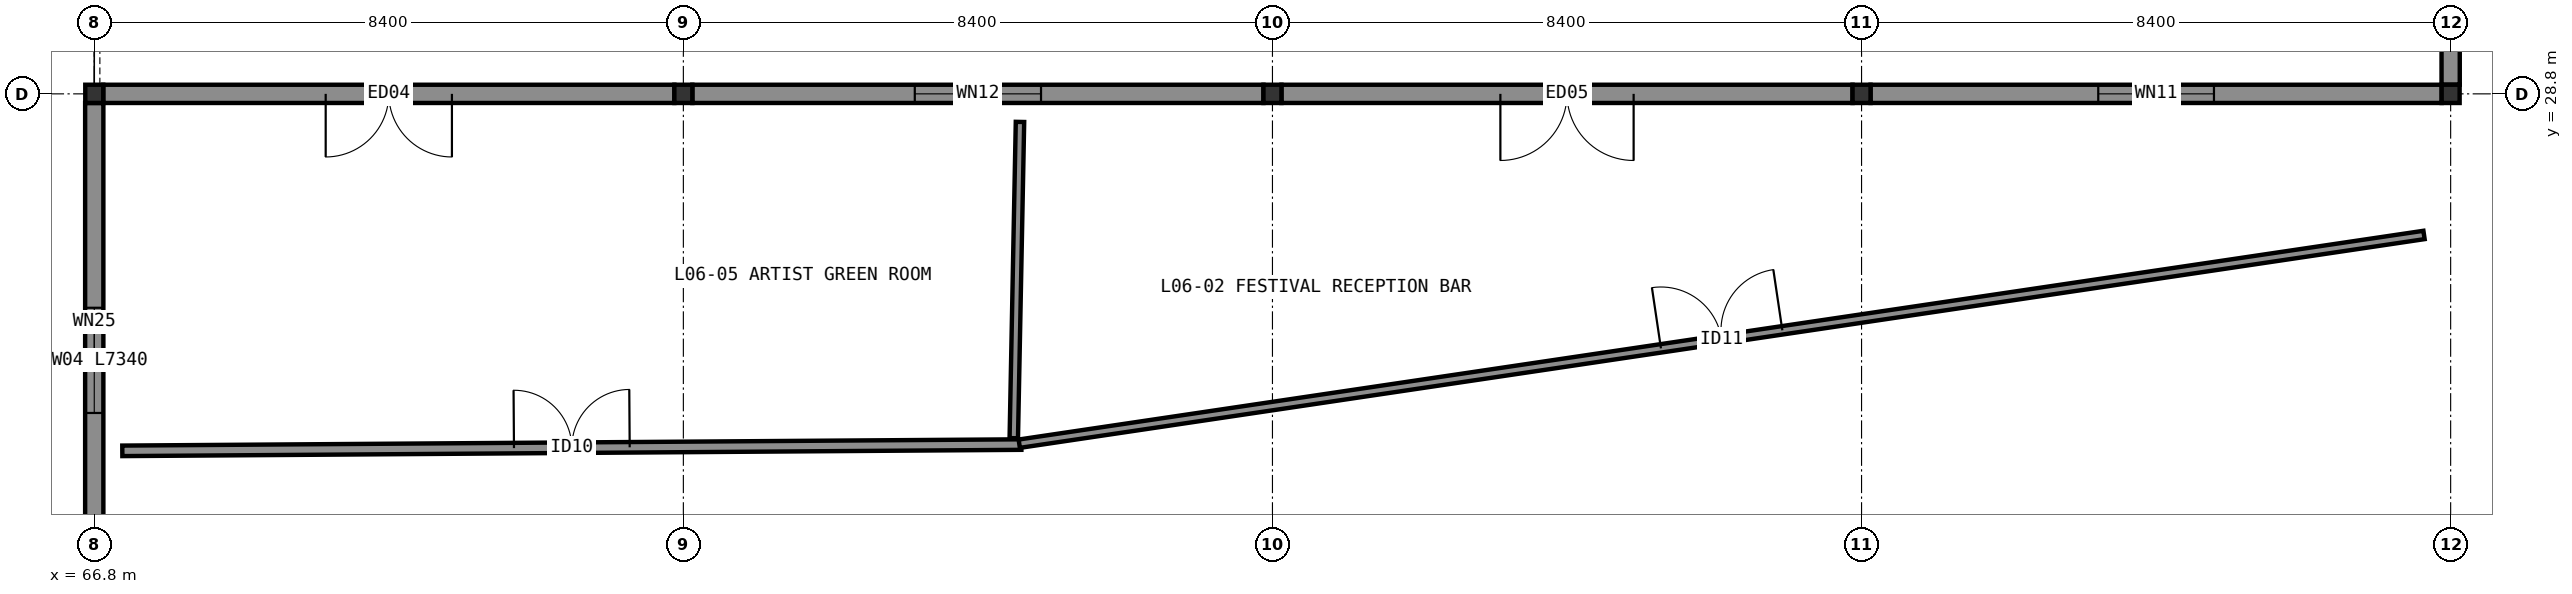
"""IFC4 building model, lengths in metres.
Left out: names, types, materials, properties, quantities, classifications, styles, units other than length and angle.
Written with IfcOpenShell. Run it as: python <this file> out.ifc"""

import sys

from ifc_helpers import new_model, si_unit, direction, frame, frame_2d, origin, origin_2d, place, context, subcontext, project, spatial, rectangle, i_section, extrude, element, fill, save


model = new_model("IFC4")
c1 = context("Model", 3, precision=1e-05, world=origin(), true_north=direction((0.0, 1.0)))
c2 = subcontext(c1, "Body", "Model", "MODEL_VIEW")
j1 = project(units=[si_unit("LENGTHUNIT", "METRE"), si_unit("PLANEANGLEUNIT", "RADIAN")], contexts=[c1])
p1 = place(None, origin())
s1 = spatial("IfcSite", under=j1, at=p1, CompositionType="ELEMENT")
p2 = place(p1, origin())
s2 = spatial("IfcBuilding", under=s1, at=p2, CompositionType="ELEMENT")
p3 = place(p2, frame((0.0, 0.0, 26.4)))
s3 = spatial("IfcBuildingStorey", under=s2, at=p3, CompositionType="ELEMENT", Elevation=26.4)
for number, where, z_axis, x_axis in (
    (1, (66.8, 28.8, 0.0), (0.0, 0.0, 1.0), (1.0, 0.0, 0.0)),
    (2, (75.2, 28.8, 0.0), (0.0, 0.0, 1.0), (1.0, 0.0, 0.0)),
    (3, (83.6, 28.8, 0.0), (0.0, 0.0, 1.0), (1.0, 0.0, 0.0)),
    (4, (92.0, 28.8, 0.0), (0.0, 0.0, 1.0), (1.0, 0.0, 0.0)),
    (5, (100.4, 28.8, 0.0), (0.0, 0.0, 1.0), (1.0, 0.0, 0.0)),
):
    element("IfcColumn", number, at=place(p3, frame(where, z_axis=z_axis, x_axis=x_axis)), inside=s3, PredefinedType="COLUMN", context=c2, shape_type="SweptSolid", body=[
        extrude(i_section(OverallWidth=0.256, OverallDepth=0.26, WebThickness=0.01, FlangeThickness=0.017, FilletRadius=0.013, at=origin_2d()), origin(), (0.0, 0.0, 1.0), 4.8),
    ])
p4 = place(p3, frame((66.8, 28.67, 0.0), z_axis=(0.0, 0.0, 1.0), x_axis=(0.0, -1.0, 0.0)))
e6 = element("IfcWall", 6, at=p4, inside=s3, PredefinedType="SOLIDWALL", context=c2, shape_type="SweptSolid", body=[
    extrude(rectangle(XDim=7.34, YDim=0.26, at=frame_2d((3.67, 0.0))), origin(), (0.0, 0.0, 1.0), 4.227),
])
p5 = place(p4, frame((2.92, 0.0, 0.95)))
e7 = element("IfcOpeningElement", 7, at=p5, cuts=e6, PredefinedType="OPENING", context=c2, shape_type="SweptSolid", body=[
    extrude(rectangle(XDim=1.5, YDim=1.2, at=frame_2d((0.75, 0.6))), frame((0.0, 0.14, 0.0), z_axis=(0.0, -1.0, 0.0), x_axis=(1.0, 0.0, 0.0)), (0.0, 0.0, 1.0), 0.28),
])
p6 = place(p3, frame((100.4, 36.27, 0.0), z_axis=(0.0, 0.0, 1.0), x_axis=(0.0, -1.0, 0.0)))
e8 = element("IfcWall", 8, at=p6, inside=s3, PredefinedType="SOLIDWALL", context=c2, shape_type="SweptSolid", body=[
    extrude(rectangle(XDim=7.34, YDim=0.26, at=frame_2d((3.67, 0.0))), origin(), (0.0, 0.0, 1.0), 4.227),
])
p7 = place(p6, frame((2.92, 0.0, 0.95)))
e9 = element("IfcOpeningElement", 9, at=p7, cuts=e8, PredefinedType="OPENING", context=c2, shape_type="SweptSolid", body=[
    extrude(rectangle(XDim=1.5, YDim=1.8, at=frame_2d((0.75, 0.9))), frame((0.0, 0.14, 0.0), z_axis=(0.0, -1.0, 0.0), x_axis=(1.0, 0.0, 0.0)), (0.0, 0.0, 1.0), 0.28),
])
p8 = place(p3, frame((100.272, 28.8, 0.0), z_axis=(0.0, 0.0, 1.0), x_axis=(-1.0, 0.0, 0.0)))
e10 = element("IfcWall", 10, at=p8, inside=s3, PredefinedType="SOLIDWALL", context=c2, shape_type="SweptSolid", body=[
    extrude(rectangle(XDim=8.144, YDim=0.26, at=frame_2d((4.072, 0.0))), origin(), (0.0, 0.0, 1.0), 4.48),
])
p9 = place(p8, frame((3.247, 0.0, 0.95)))
e11 = element("IfcOpeningElement", 11, at=p9, cuts=e10, PredefinedType="OPENING", context=c2, shape_type="SweptSolid", body=[
    extrude(rectangle(XDim=1.65, YDim=1.8, at=frame_2d((0.825, 0.9))), frame((0.0, 0.14, 0.0), z_axis=(0.0, -1.0, 0.0), x_axis=(1.0, 0.0, 0.0)), (0.0, 0.0, 1.0), 0.28),
])
p10 = place(p3, frame((91.872, 28.8, 0.0), z_axis=(0.0, 0.0, 1.0), x_axis=(-1.0, 0.0, 0.0)))
e12 = element("IfcWall", 12, at=p10, inside=s3, PredefinedType="SOLIDWALL", context=c2, shape_type="SweptSolid", body=[
    extrude(rectangle(XDim=8.144, YDim=0.26, at=frame_2d((4.072, 0.0))), origin(), (0.0, 0.0, 1.0), 4.48),
])
p11 = place(p10, frame((3.122, 0.0, 0.0)))
e13 = element("IfcOpeningElement", 13, at=p11, cuts=e12, PredefinedType="OPENING", context=c2, shape_type="SweptSolid", body=[
    extrude(rectangle(XDim=1.9, YDim=2.25, at=frame_2d((0.95, 1.125))), frame((0.0, 0.14, 0.0), z_axis=(0.0, -1.0, 0.0), x_axis=(1.0, 0.0, 0.0)), (0.0, 0.0, 1.0), 0.28),
])
p12 = place(p3, frame((83.472, 28.8, 0.0), z_axis=(0.0, 0.0, 1.0), x_axis=(-1.0, 0.0, 0.0)))
e14 = element("IfcWall", 14, at=p12, inside=s3, PredefinedType="SOLIDWALL", context=c2, shape_type="SweptSolid", body=[
    extrude(rectangle(XDim=8.144, YDim=0.26, at=frame_2d((4.072, 0.0))), origin(), (0.0, 0.0, 1.0), 4.48),
])
p13 = place(p12, frame((3.172, 0.0, 0.95)))
e15 = element("IfcOpeningElement", 15, at=p13, cuts=e14, PredefinedType="OPENING", context=c2, shape_type="SweptSolid", body=[
    extrude(rectangle(XDim=1.8, YDim=1.8, at=frame_2d((0.9, 0.9))), frame((0.0, 0.14, 0.0), z_axis=(0.0, -1.0, 0.0), x_axis=(1.0, 0.0, 0.0)), (0.0, 0.0, 1.0), 0.28),
])
p14 = place(p3, frame((75.072, 28.8, 0.0), z_axis=(0.0, 0.0, 1.0), x_axis=(-1.0, 0.0, 0.0)))
e16 = element("IfcWall", 16, at=p14, inside=s3, PredefinedType="SOLIDWALL", context=c2, shape_type="SweptSolid", body=[
    extrude(rectangle(XDim=8.144, YDim=0.26, at=frame_2d((4.072, 0.0))), origin(), (0.0, 0.0, 1.0), 4.48),
])
p15 = place(p14, frame((3.172, 0.0, 0.0)))
e17 = element("IfcOpeningElement", 17, at=p15, cuts=e16, PredefinedType="OPENING", context=c2, shape_type="SweptSolid", body=[
    extrude(rectangle(XDim=1.8, YDim=2.2, at=frame_2d((0.9, 1.1))), frame((0.0, 0.14, 0.0), z_axis=(0.0, -1.0, 0.0), x_axis=(1.0, 0.0, 0.0)), (0.0, 0.0, 1.0), 0.28),
])
p16 = place(p3, frame((67.2, 23.71, 0.0), z_axis=(0.0, 0.0, 1.0), x_axis=(0.999975708806, 0.006970064359, 0.0)))
e18 = element("IfcWall", 18, at=p16, inside=s3, PredefinedType="PARTITIONING", context=c2, shape_type="SweptSolid", body=[
    extrude(rectangle(XDim=12.82, YDim=0.15, at=frame_2d((6.41, 0.0))), origin(), (0.0, 0.0, 1.0), 4.48),
])
p17 = place(p16, frame((5.585, 0.0, 0.0)))
e19 = element("IfcOpeningElement", 19, at=p17, cuts=e18, PredefinedType="OPENING", context=c2, shape_type="SweptSolid", body=[
    extrude(rectangle(XDim=1.65, YDim=2.18, at=frame_2d((0.825, 1.09))), frame((0.0, 0.085, 0.0), z_axis=(0.0, -1.0, 0.0), x_axis=(1.0, 0.0, 0.0)), (0.0, 0.0, 1.0), 0.17),
])
p18 = place(p3, frame((79.99, 23.812, 0.0), z_axis=(0.0, 0.0, 1.0), x_axis=(0.989140649327, 0.146972024034, 0.0)))
e20 = element("IfcWall", 20, at=p18, inside=s3, PredefinedType="PARTITIONING", context=c2, shape_type="SweptSolid", body=[
    extrude(rectangle(XDim=20.251, YDim=0.12, at=frame_2d((10.125, 0.0))), origin(), (0.0, 0.0, 1.0), 4.48),
])
p19 = place(p18, frame((9.25, 0.0, 0.0)))
e21 = element("IfcOpeningElement", 21, at=p19, cuts=e20, PredefinedType="OPENING", context=c2, shape_type="SweptSolid", body=[
    extrude(rectangle(XDim=1.75, YDim=2.22, at=frame_2d((0.875, 1.11))), frame((0.0, 0.07, 0.0), z_axis=(0.0, -1.0, 0.0), x_axis=(1.0, 0.0, 0.0)), (0.0, 0.0, 1.0), 0.14),
])
p20 = place(p3, frame((80.0, 28.4, 0.0), z_axis=(0.0, 0.0, 1.0), x_axis=(-0.019592405903, -0.999808050393, 0.0)))
e22 = element("IfcWall", 22, at=p20, inside=s3, PredefinedType="PARTITIONING", context=c2, shape_type="SweptSolid", body=[
    extrude(rectangle(XDim=4.511, YDim=0.12, at=frame_2d((2.255, 0.0))), origin(), (0.0, 0.0, 1.0), 4.48),
])
p21 = place(p5, origin())
e23 = element("IfcWindow", 23, at=p21, inside=s3, PartitioningType="SINGLE_PANEL", PredefinedType="WINDOW", context=c2, shape_type="SweptSolid", body=[
    extrude(rectangle(XDim=1.5, YDim=1.2, at=frame_2d((0.75, 0.6))), frame((0.0, 0.03, 0.0), z_axis=(0.0, -1.0, 0.0), x_axis=(1.0, 0.0, 0.0)), (0.0, 0.0, 1.0), 0.06),
])
fill(e7, e23)
p22 = place(p9, origin())
e24 = element("IfcWindow", 24, at=p22, inside=s3, PartitioningType="SINGLE_PANEL", PredefinedType="WINDOW", context=c2, shape_type="SweptSolid", body=[
    extrude(rectangle(XDim=1.65, YDim=1.8, at=frame_2d((0.825, 0.9))), frame((0.0, 0.03, 0.0), z_axis=(0.0, -1.0, 0.0), x_axis=(1.0, 0.0, 0.0)), (0.0, 0.0, 1.0), 0.06),
])
fill(e11, e24)
p23 = place(p11, frame((1.9, 0.0, 0.0), z_axis=(0.0, 0.0, 1.0), x_axis=(-1.0, 0.0, 0.0)))
e25 = element("IfcDoor", 25, at=p23, inside=s3, OperationType="DOUBLE_DOOR_SINGLE_SWING", PredefinedType="DOOR", context=c2, shape_type="SweptSolid", body=[
    extrude(rectangle(XDim=1.9, YDim=2.25, at=frame_2d((0.95, 1.125))), frame((0.0, 0.025, 0.0), z_axis=(0.0, -1.0, 0.0), x_axis=(1.0, 0.0, 0.0)), (0.0, 0.0, 1.0), 0.05),
])
fill(e13, e25)
p24 = place(p13, origin())
e26 = element("IfcWindow", 26, at=p24, inside=s3, PartitioningType="DOUBLE_PANEL_VERTICAL", PredefinedType="WINDOW", context=c2, shape_type="SweptSolid", body=[
    extrude(rectangle(XDim=1.8, YDim=1.8, at=frame_2d((0.9, 0.9))), frame((0.0, 0.03, 0.0), z_axis=(0.0, -1.0, 0.0), x_axis=(1.0, 0.0, 0.0)), (0.0, 0.0, 1.0), 0.06),
])
fill(e15, e26)
p25 = place(p15, frame((1.8, 0.0, 0.0), z_axis=(0.0, 0.0, 1.0), x_axis=(-1.0, 0.0, 0.0)))
e27 = element("IfcDoor", 27, at=p25, inside=s3, OperationType="DOUBLE_DOOR_SINGLE_SWING", PredefinedType="DOOR", context=c2, shape_type="SweptSolid", body=[
    extrude(rectangle(XDim=1.8, YDim=2.2, at=frame_2d((0.9, 1.1))), frame((0.0, 0.025, 0.0), z_axis=(0.0, -1.0, 0.0), x_axis=(1.0, 0.0, 0.0)), (0.0, 0.0, 1.0), 0.05),
])
fill(e17, e27)
p26 = place(p17, origin())
e28 = element("IfcDoor", 28, at=p26, inside=s3, OperationType="DOUBLE_DOOR_SINGLE_SWING", PredefinedType="DOOR", context=c2, shape_type="SweptSolid", body=[
    extrude(rectangle(XDim=1.65, YDim=2.18, at=frame_2d((0.825, 1.09))), frame((0.0, 0.025, 0.0), z_axis=(0.0, -1.0, 0.0), x_axis=(1.0, 0.0, 0.0)), (0.0, 0.0, 1.0), 0.05),
])
fill(e19, e28)
p27 = place(p19, origin())
e29 = element("IfcDoor", 29, at=p27, inside=s3, OperationType="DOUBLE_DOOR_SINGLE_SWING", PredefinedType="DOOR", context=c2, shape_type="SweptSolid", body=[
    extrude(rectangle(XDim=1.75, YDim=2.22, at=frame_2d((0.875, 1.11))), frame((0.0, 0.025, 0.0), z_axis=(0.0, -1.0, 0.0), x_axis=(1.0, 0.0, 0.0)), (0.0, 0.0, 1.0), 0.05),
])
fill(e21, e29)
save(model, sys.argv[1])
